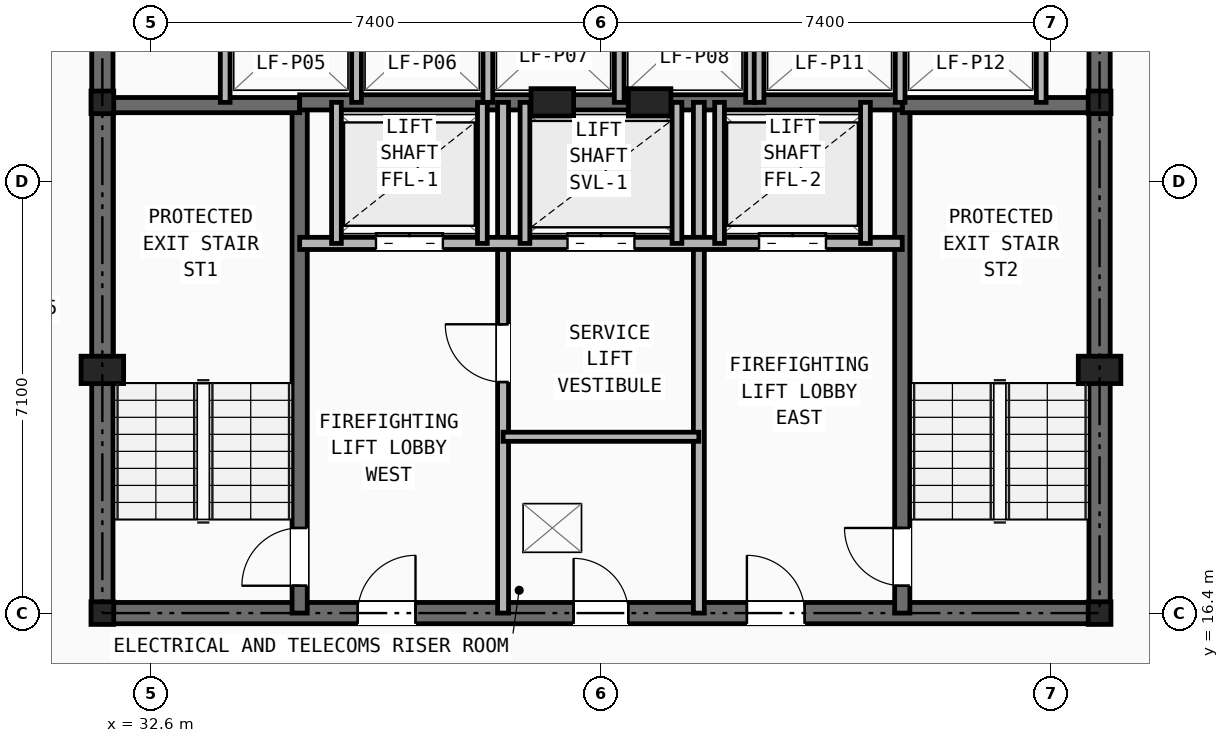
"""IFC4 building model, lengths in metres.
Left out: names, types, materials, properties, quantities, classifications, styles, units other than length and angle.
Written with IfcOpenShell. Run it as: python <this file> out.ifc"""

import sys

from ifc_helpers import new_model, si_unit, direction, frame, frame_2d, origin, origin_2d, place, context, subcontext, project, spatial, rectangle, i_section, extrude, element, fill, save


model = new_model("IFC4")
c1 = context("Model", 3, precision=1e-05, world=origin(), true_north=direction((0.0, 1.0)))
c2 = subcontext(c1, "Body", "Model", "MODEL_VIEW")
j1 = project(units=[si_unit("LENGTHUNIT", "METRE"), si_unit("PLANEANGLEUNIT", "RADIAN")], contexts=[c1])
p1 = place(None, origin())
s1 = spatial("IfcSite", under=j1, at=p1, CompositionType="ELEMENT")
p2 = place(p1, origin())
s2 = spatial("IfcBuilding", under=s1, at=p2, CompositionType="ELEMENT")
p3 = place(p2, frame((0.0, 0.0, 27.2)))
s3 = spatial("IfcBuildingStorey", under=s2, at=p3, CompositionType="ELEMENT", Elevation=27.2)
for number, where, z_axis, x_axis in (
    (1, (31.8, 16.4, 0.0), (0.0, 0.0, 1.0), (1.0, 0.0, 0.0)),
    (2, (48.2, 16.4, 0.0), (0.0, 0.0, 1.0), (1.0, 0.0, 0.0)),
    (3, (31.8, 24.8, 0.0), (0.0, 0.0, 1.0), (1.0, 0.0, 0.0)),
    (4, (48.2, 24.8, 0.0), (0.0, 0.0, 1.0), (1.0, 0.0, 0.0)),
):
    element("IfcColumn", number, at=place(p3, frame(where, z_axis=z_axis, x_axis=x_axis)), inside=s3, PredefinedType="COLUMN", context=c2, shape_type="SweptSolid", body=[
        extrude(i_section(OverallWidth=0.374, OverallDepth=0.372, WebThickness=0.016, FlangeThickness=0.026, at=origin_2d()), origin(), (0.0, 0.0, 1.0), 3.2),
    ])
for number, where, z_axis, x_axis in (
    (5, (31.8, 20.4, 0.0), (0.0, 0.0, 1.0), (1.0, 0.0, 0.0)),
    (6, (48.2, 20.4, 0.0), (0.0, 0.0, 1.0), (1.0, 0.0, 0.0)),
    (7, (39.2, 24.8, 0.0), (0.0, 0.0, 1.0), (1.0, 0.0, 0.0)),
    (8, (40.8, 24.8, 0.0), (0.0, 0.0, 1.0), (1.0, 0.0, 0.0)),
):
    element("IfcColumn", number, at=place(p3, frame(where, z_axis=z_axis, x_axis=x_axis)), inside=s3, PredefinedType="PILASTER", context=c2, shape_type="SweptSolid", body=[
        extrude(rectangle(XDim=0.7, YDim=0.45, at=origin_2d()), origin(), (0.0, 0.0, 1.0), 3.2),
    ])
p4 = place(p3, frame((31.8, 16.4, 0.0), z_axis=(0.0, 0.0, 1.0), x_axis=(1.0, 0.0, 0.0)))
e9 = element("IfcWall", 9, at=p4, inside=s3, PredefinedType="SHEAR", context=c2, shape_type="SweptSolid", body=[
    extrude(rectangle(XDim=16.4, YDim=0.35, at=frame_2d((8.2, 0.0))), origin(), (0.0, 0.0, 1.0), 2.98),
])
p5 = place(p4, frame((7.75, 0.0, 0.0)))
e10 = element("IfcOpeningElement", 10, at=p5, cuts=e9, PredefinedType="OPENING", context=c2, shape_type="SweptSolid", body=[
    extrude(rectangle(XDim=0.9, YDim=2.1, at=frame_2d((0.45, 1.05))), frame((0.0, 0.185, 0.0), z_axis=(0.0, -1.0, 0.0), x_axis=(1.0, 0.0, 0.0)), (0.0, 0.0, 1.0), 0.37),
])
p6 = place(p4, frame((4.2, 0.0, 0.0)))
e11 = element("IfcOpeningElement", 11, at=p6, cuts=e9, PredefinedType="OPENING", context=c2, shape_type="SweptSolid", body=[
    extrude(rectangle(XDim=0.95, YDim=2.1, at=frame_2d((0.475, 1.05))), frame((0.0, 0.185, 0.0), z_axis=(0.0, -1.0, 0.0), x_axis=(1.0, 0.0, 0.0)), (0.0, 0.0, 1.0), 0.37),
])
p7 = place(p4, frame((10.6, 0.0, 0.0)))
e12 = element("IfcOpeningElement", 12, at=p7, cuts=e9, PredefinedType="OPENING", context=c2, shape_type="SweptSolid", body=[
    extrude(rectangle(XDim=0.95, YDim=2.1, at=frame_2d((0.475, 1.05))), frame((0.0, 0.185, 0.0), z_axis=(0.0, -1.0, 0.0), x_axis=(1.0, 0.0, 0.0)), (0.0, 0.0, 1.0), 0.37),
])
p8 = place(p3, frame((31.8, 16.4, 0.0), z_axis=(0.0, 0.0, 1.0), x_axis=(0.0, 1.0, 0.0)))
e13 = element("IfcWall", 13, at=p8, inside=s3, PredefinedType="SHEAR", context=c2, shape_type="SweptSolid", body=[
    extrude(rectangle(XDim=14.8, YDim=0.35, at=frame_2d((7.4, 0.0))), origin(), (0.0, 0.0, 1.0), 2.98),
])
p9 = place(p8, frame((11.0, 0.0, 0.0)))
e14 = element("IfcOpeningElement", 14, at=p9, cuts=e13, PredefinedType="OPENING", context=c2, shape_type="SweptSolid", body=[
    extrude(rectangle(XDim=1.1, YDim=2.15, at=frame_2d((0.55, 1.075))), frame((0.0, 0.185, 0.0), z_axis=(0.0, -1.0, 0.0), x_axis=(1.0, 0.0, 0.0)), (0.0, 0.0, 1.0), 0.37),
])
p10 = place(p3, frame((48.2, 16.4, 0.0), z_axis=(0.0, 0.0, 1.0), x_axis=(0.0, 1.0, 0.0)))
e15 = element("IfcWall", 15, at=p10, inside=s3, PredefinedType="SHEAR", context=c2, shape_type="SweptSolid", body=[
    extrude(rectangle(XDim=14.8, YDim=0.35, at=frame_2d((7.4, 0.0))), origin(), (0.0, 0.0, 1.0), 2.98),
])
p11 = place(p10, frame((11.0, 0.0, 0.0)))
e16 = element("IfcOpeningElement", 16, at=p11, cuts=e15, PredefinedType="OPENING", context=c2, shape_type="SweptSolid", body=[
    extrude(rectangle(XDim=1.1, YDim=2.15, at=frame_2d((0.55, 1.075))), frame((0.0, 0.185, 0.0), z_axis=(0.0, -1.0, 0.0), x_axis=(1.0, 0.0, 0.0)), (0.0, 0.0, 1.0), 0.37),
])
p12 = place(p3, frame((35.045, 16.4, 0.0), z_axis=(0.0, 0.0, 1.0), x_axis=(0.0, 1.0, 0.0)))
e17 = element("IfcWall", 17, at=p12, inside=s3, PredefinedType="SHEAR", context=c2, shape_type="SweptSolid", body=[
    extrude(rectangle(XDim=8.4, YDim=0.25, at=frame_2d((4.2, 0.0))), origin(), (0.0, 0.0, 1.0), 2.98),
])
p13 = place(p12, frame((0.45, 0.0, 0.0)))
e18 = element("IfcOpeningElement", 18, at=p13, cuts=e17, PredefinedType="OPENING", context=c2, shape_type="SweptSolid", body=[
    extrude(rectangle(XDim=0.95, YDim=2.1, at=frame_2d((0.475, 1.05))), frame((0.0, 0.135, 0.0), z_axis=(0.0, -1.0, 0.0), x_axis=(1.0, 0.0, 0.0)), (0.0, 0.0, 1.0), 0.27),
])
p14 = place(p3, frame((31.8, 24.755, 0.0), z_axis=(0.0, 0.0, 1.0), x_axis=(1.0, 0.0, 0.0)))
e19 = element("IfcWall", 19, at=p14, inside=s3, PredefinedType="SHEAR", context=c2, shape_type="SweptSolid", body=[
    extrude(rectangle(XDim=3.245, YDim=0.25, at=frame_2d((1.623, 0.0))), origin(), (0.0, 0.0, 1.0), 2.98),
])
p15 = place(p3, frame((44.955, 16.4, 0.0), z_axis=(0.0, 0.0, 1.0), x_axis=(0.0, 1.0, 0.0)))
e20 = element("IfcWall", 20, at=p15, inside=s3, PredefinedType="SHEAR", context=c2, shape_type="SweptSolid", body=[
    extrude(rectangle(XDim=8.4, YDim=0.25, at=frame_2d((4.2, 0.0))), origin(), (0.0, 0.0, 1.0), 2.98),
])
p16 = place(p15, frame((0.45, 0.0, 0.0)))
e21 = element("IfcOpeningElement", 21, at=p16, cuts=e20, PredefinedType="OPENING", context=c2, shape_type="SweptSolid", body=[
    extrude(rectangle(XDim=0.95, YDim=2.1, at=frame_2d((0.475, 1.05))), frame((0.0, 0.135, 0.0), z_axis=(0.0, -1.0, 0.0), x_axis=(1.0, 0.0, 0.0)), (0.0, 0.0, 1.0), 0.27),
])
p17 = place(p3, frame((44.955, 24.755, 0.0), z_axis=(0.0, 0.0, 1.0), x_axis=(1.0, 0.0, 0.0)))
e22 = element("IfcWall", 22, at=p17, inside=s3, PredefinedType="SHEAR", context=c2, shape_type="SweptSolid", body=[
    extrude(rectangle(XDim=3.245, YDim=0.25, at=frame_2d((1.623, 0.0))), origin(), (0.0, 0.0, 1.0), 2.98),
])
p18 = place(p3, frame((35.045, 24.8, 0.0), z_axis=(0.0, 0.0, 1.0), x_axis=(1.0, 0.0, 0.0)))
e23 = element("IfcWall", 23, at=p18, inside=s3, PredefinedType="SHEAR", context=c2, shape_type="SweptSolid", body=[
    extrude(rectangle(XDim=9.91, YDim=0.25, at=frame_2d((4.955, 0.0))), origin(), (0.0, 0.0, 1.0), 2.98),
])
p19 = place(p3, frame((38.39, 16.4, 0.0), z_axis=(0.0, 0.0, 1.0), x_axis=(0.0, 1.0, 0.0)))
e24 = element("IfcWall", 24, at=p19, inside=s3, PredefinedType="PARTITIONING", context=c2, shape_type="SweptSolid", body=[
    extrude(rectangle(XDim=8.4, YDim=0.18, at=frame_2d((4.2, 0.0))), origin(), (0.0, 0.0, 1.0), 2.431),
])
p20 = place(p19, frame((3.8, 0.0, 0.0)))
e25 = element("IfcOpeningElement", 25, at=p20, cuts=e24, PredefinedType="OPENING", context=c2, shape_type="SweptSolid", body=[
    extrude(rectangle(XDim=0.95, YDim=2.1, at=frame_2d((0.475, 1.05))), frame((0.0, 0.1, 0.0), z_axis=(0.0, -1.0, 0.0), x_axis=(1.0, 0.0, 0.0)), (0.0, 0.0, 1.0), 0.2),
])
p21 = place(p3, frame((41.61, 16.4, 0.0), z_axis=(0.0, 0.0, 1.0), x_axis=(0.0, 1.0, 0.0)))
e26 = element("IfcWall", 26, at=p21, inside=s3, PredefinedType="PARTITIONING", context=c2, shape_type="SweptSolid", body=[
    extrude(rectangle(XDim=8.4, YDim=0.18, at=frame_2d((4.2, 0.0))), origin(), (0.0, 0.0, 1.0), 2.431),
])
p22 = place(p3, frame((35.045, 22.48, 0.0), z_axis=(0.0, 0.0, 1.0), x_axis=(1.0, 0.0, 0.0)))
e27 = element("IfcWall", 27, at=p22, inside=s3, PredefinedType="SOLIDWALL", context=c2, shape_type="SweptSolid", body=[
    extrude(rectangle(XDim=9.91, YDim=0.2, at=frame_2d((4.955, 0.0))), origin(), (0.0, 0.0, 1.0), 2.98),
])
p23 = place(p22, frame((1.255, 0.0, 0.0)))
e28 = element("IfcOpeningElement", 28, at=p23, cuts=e27, PredefinedType="OPENING", context=c2, shape_type="SweptSolid", body=[
    extrude(rectangle(XDim=1.1, YDim=2.15, at=frame_2d((0.55, 1.075))), frame((0.0, 0.11, 0.0), z_axis=(0.0, -1.0, 0.0), x_axis=(1.0, 0.0, 0.0)), (0.0, 0.0, 1.0), 0.22),
])
p24 = place(p22, frame((7.555, 0.0, 0.0)))
e29 = element("IfcOpeningElement", 29, at=p24, cuts=e27, PredefinedType="OPENING", context=c2, shape_type="SweptSolid", body=[
    extrude(rectangle(XDim=1.1, YDim=2.15, at=frame_2d((0.55, 1.075))), frame((0.0, 0.11, 0.0), z_axis=(0.0, -1.0, 0.0), x_axis=(1.0, 0.0, 0.0)), (0.0, 0.0, 1.0), 0.22),
])
p25 = place(p22, frame((4.405, 0.0, 0.0)))
e30 = element("IfcOpeningElement", 30, at=p25, cuts=e27, PredefinedType="OPENING", context=c2, shape_type="SweptSolid", body=[
    extrude(rectangle(XDim=1.1, YDim=2.15, at=frame_2d((0.55, 1.075))), frame((0.0, 0.11, 0.0), z_axis=(0.0, -1.0, 0.0), x_axis=(1.0, 0.0, 0.0)), (0.0, 0.0, 1.0), 0.22),
])
p26 = place(p3, frame((38.39, 19.3, 0.0), z_axis=(0.0, 0.0, 1.0), x_axis=(1.0, 0.0, 0.0)))
e31 = element("IfcWall", 31, at=p26, inside=s3, PredefinedType="PARTITIONING", context=c2, shape_type="SweptSolid", body=[
    extrude(rectangle(XDim=3.22, YDim=0.15, at=frame_2d((1.61, 0.0))), origin(), (0.0, 0.0, 1.0), 2.98),
])
for number, where, z_axis, x_axis in (
    (32, (35.65, 22.48, 0.0), (0.0, 0.0, 1.0), (0.0, 1.0, 0.0)),
    (33, (38.05, 22.48, 0.0), (0.0, 0.0, 1.0), (0.0, 1.0, 0.0)),
    (34, (41.95, 22.48, 0.0), (0.0, 0.0, 1.0), (0.0, 1.0, 0.0)),
    (35, (44.35, 22.48, 0.0), (0.0, 0.0, 1.0), (0.0, 1.0, 0.0)),
    (36, (38.75, 22.48, 0.0), (0.0, 0.0, 1.0), (0.0, 1.0, 0.0)),
    (37, (41.25, 22.48, 0.0), (0.0, 0.0, 1.0), (0.0, 1.0, 0.0)),
):
    element("IfcWall", number, at=place(p3, frame(where, z_axis=z_axis, x_axis=x_axis)), inside=s3, PredefinedType="SOLIDWALL", context=c2, shape_type="SweptSolid", body=[
        extrude(rectangle(XDim=2.32, YDim=0.16, at=frame_2d((1.16, 0.0))), origin(), (0.0, 0.0, 1.0), 2.98),
    ])
for number, where, z_axis, x_axis in (
    (38, (33.82, 24.8, 0.0), (0.0, 0.0, 1.0), (0.0, 1.0, 0.0)),
    (39, (35.98, 24.8, 0.0), (0.0, 0.0, 1.0), (0.0, 1.0, 0.0)),
    (40, (38.14, 24.8, 0.0), (0.0, 0.0, 1.0), (0.0, 1.0, 0.0)),
    (41, (40.3, 24.8, 0.0), (0.0, 0.0, 1.0), (0.0, 1.0, 0.0)),
    (42, (42.46, 24.8, 0.0), (0.0, 0.0, 1.0), (0.0, 1.0, 0.0)),
    (43, (42.6, 24.8, 0.0), (0.0, 0.0, 1.0), (0.0, 1.0, 0.0)),
    (44, (44.92, 24.8, 0.0), (0.0, 0.0, 1.0), (0.0, 1.0, 0.0)),
    (45, (47.24, 24.8, 0.0), (0.0, 0.0, 1.0), (0.0, 1.0, 0.0)),
):
    element("IfcWall", number, at=place(p3, frame(where, z_axis=z_axis, x_axis=x_axis)), inside=s3, PredefinedType="SOLIDWALL", context=c2, shape_type="SweptSolid", body=[
        extrude(rectangle(XDim=2.08, YDim=0.16, at=frame_2d((1.04, 0.0))), origin(), (0.0, 0.0, 1.0), 2.98),
    ])
p27 = place(p5, origin())
e46 = element("IfcDoor", 46, at=p27, inside=s3, OperationType="SINGLE_SWING_LEFT", PredefinedType="DOOR", context=c2, shape_type="SweptSolid", body=[
    extrude(rectangle(XDim=0.9, YDim=2.1, at=frame_2d((0.45, 1.05))), frame((0.0, 0.025, 0.0), z_axis=(0.0, -1.0, 0.0), x_axis=(1.0, 0.0, 0.0)), (0.0, 0.0, 1.0), 0.05),
])
fill(e10, e46)
p28 = place(p20, origin())
e47 = element("IfcDoor", 47, at=p28, inside=s3, OperationType="SINGLE_SWING_RIGHT", PredefinedType="DOOR", context=c2, shape_type="SweptSolid", body=[
    extrude(rectangle(XDim=0.95, YDim=2.1, at=frame_2d((0.475, 1.05))), frame((0.0, 0.025, 0.0), z_axis=(0.0, -1.0, 0.0), x_axis=(1.0, 0.0, 0.0)), (0.0, 0.0, 1.0), 0.05),
])
fill(e25, e47)
p29 = place(p13, origin())
e48 = element("IfcDoor", 48, at=p29, inside=s3, OperationType="SINGLE_SWING_LEFT", PredefinedType="DOOR", context=c2, shape_type="SweptSolid", body=[
    extrude(rectangle(XDim=0.95, YDim=2.1, at=frame_2d((0.475, 1.05))), frame((0.0, 0.025, 0.0), z_axis=(0.0, -1.0, 0.0), x_axis=(1.0, 0.0, 0.0)), (0.0, 0.0, 1.0), 0.05),
])
fill(e18, e48)
p30 = place(p16, origin())
e49 = element("IfcDoor", 49, at=p30, inside=s3, OperationType="SINGLE_SWING_RIGHT", PredefinedType="DOOR", context=c2, shape_type="SweptSolid", body=[
    extrude(rectangle(XDim=0.95, YDim=2.1, at=frame_2d((0.475, 1.05))), frame((0.0, 0.025, 0.0), z_axis=(0.0, -1.0, 0.0), x_axis=(1.0, 0.0, 0.0)), (0.0, 0.0, 1.0), 0.05),
])
fill(e21, e49)
p31 = place(p6, origin())
e50 = element("IfcDoor", 50, at=p31, inside=s3, OperationType="SINGLE_SWING_RIGHT", PredefinedType="DOOR", context=c2, shape_type="SweptSolid", body=[
    extrude(rectangle(XDim=0.95, YDim=2.1, at=frame_2d((0.475, 1.05))), frame((0.0, 0.025, 0.0), z_axis=(0.0, -1.0, 0.0), x_axis=(1.0, 0.0, 0.0)), (0.0, 0.0, 1.0), 0.05),
])
fill(e11, e50)
p32 = place(p7, origin())
e51 = element("IfcDoor", 51, at=p32, inside=s3, OperationType="SINGLE_SWING_LEFT", PredefinedType="DOOR", context=c2, shape_type="SweptSolid", body=[
    extrude(rectangle(XDim=0.95, YDim=2.1, at=frame_2d((0.475, 1.05))), frame((0.0, 0.025, 0.0), z_axis=(0.0, -1.0, 0.0), x_axis=(1.0, 0.0, 0.0)), (0.0, 0.0, 1.0), 0.05),
])
fill(e12, e51)
p33 = place(p23, origin())
e52 = element("IfcDoor", 52, at=p33, inside=s3, OperationType="DOUBLE_DOOR_SLIDING", PredefinedType="DOOR", context=c2, shape_type="SweptSolid", body=[
    extrude(rectangle(XDim=1.1, YDim=2.15, at=frame_2d((0.55, 1.075))), frame((0.0, 0.025, 0.0), z_axis=(0.0, -1.0, 0.0), x_axis=(1.0, 0.0, 0.0)), (0.0, 0.0, 1.0), 0.05),
])
fill(e28, e52)
p34 = place(p24, origin())
e53 = element("IfcDoor", 53, at=p34, inside=s3, OperationType="DOUBLE_DOOR_SLIDING", PredefinedType="DOOR", context=c2, shape_type="SweptSolid", body=[
    extrude(rectangle(XDim=1.1, YDim=2.15, at=frame_2d((0.55, 1.075))), frame((0.0, 0.025, 0.0), z_axis=(0.0, -1.0, 0.0), x_axis=(1.0, 0.0, 0.0)), (0.0, 0.0, 1.0), 0.05),
])
fill(e29, e53)
p35 = place(p25, origin())
e54 = element("IfcDoor", 54, at=p35, inside=s3, OperationType="DOUBLE_DOOR_SLIDING", PredefinedType="DOOR", context=c2, shape_type="SweptSolid", body=[
    extrude(rectangle(XDim=1.1, YDim=2.15, at=frame_2d((0.55, 1.075))), frame((0.0, 0.025, 0.0), z_axis=(0.0, -1.0, 0.0), x_axis=(1.0, 0.0, 0.0)), (0.0, 0.0, 1.0), 0.05),
])
fill(e30, e54)
save(model, sys.argv[1])
